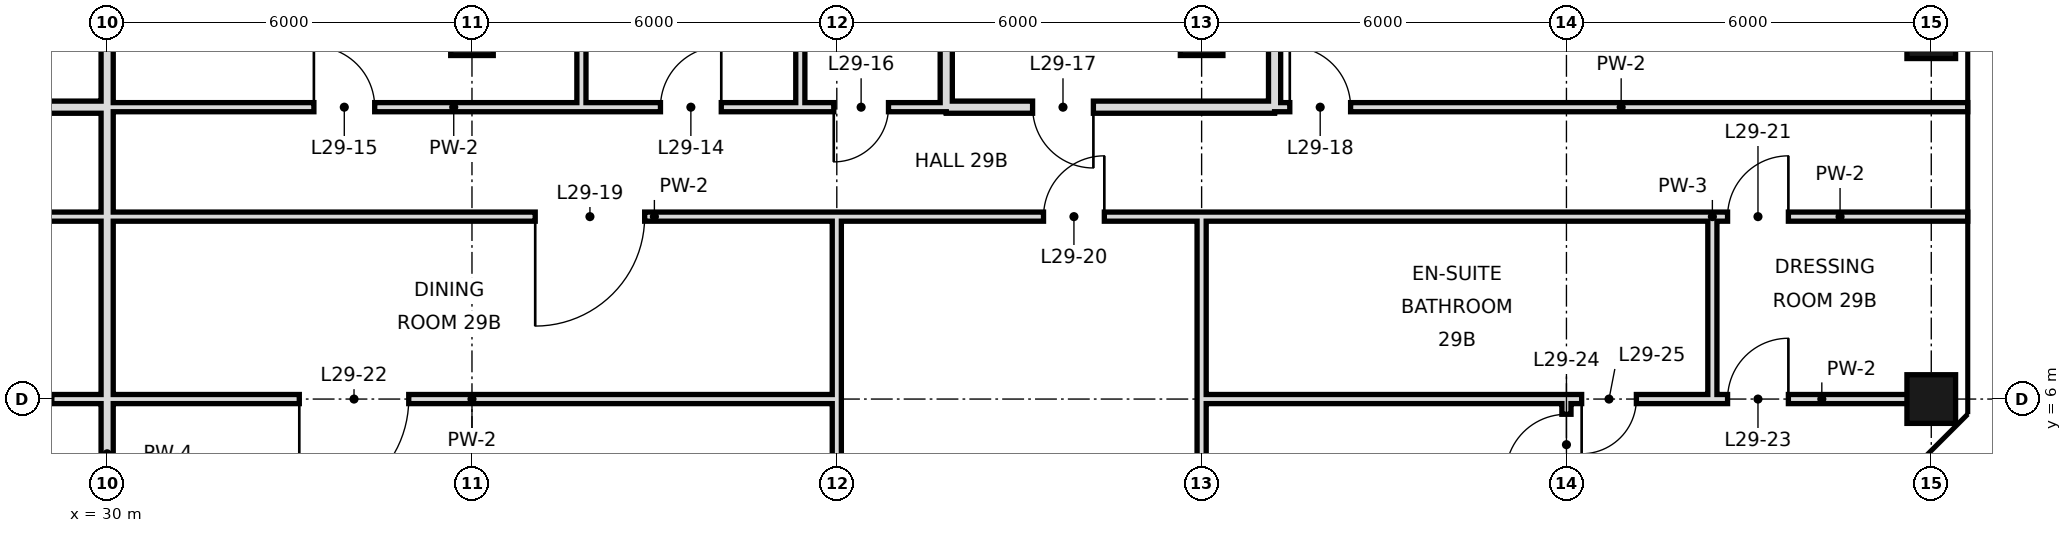
"""IFC4 building model, lengths in metres.
Left out: names, types, materials, properties, quantities, classifications, styles, units other than length and angle.
Written with IfcOpenShell. Run it as: python <this file> out.ifc"""

import sys

from ifc_helpers import new_model, si_unit, direction, frame, frame_2d, origin, origin_2d, place, context, subcontext, project, spatial, rectangle, hollow_rectangle, extrude, element, fill, save


model = new_model("IFC4")
c1 = context("Model", 3, precision=1e-05, world=origin(), true_north=direction((0.0, 1.0)))
c2 = subcontext(c1, "Body", "Model", "MODEL_VIEW")
j1 = project(units=[si_unit("LENGTHUNIT", "METRE"), si_unit("PLANEANGLEUNIT", "RADIAN")], contexts=[c1])
p1 = place(None, origin())
s1 = spatial("IfcSite", under=j1, at=p1, CompositionType="ELEMENT")
p2 = place(p1, origin())
s2 = spatial("IfcBuilding", under=s1, at=p2, CompositionType="ELEMENT")
p3 = place(p2, frame((0.0, 0.0, 130.4)))
s3 = spatial("IfcBuildingStorey", under=s2, at=p3, CompositionType="ELEMENT", Elevation=130.4)
for number, where, z_axis, x_axis in (
    (1, (36.0, 12.0, 0.0), (0.0, 0.0, 1.0), (1.0, 0.0, 0.0)),
    (2, (48.0, 12.0, 0.0), (0.0, 0.0, 1.0), (1.0, 0.0, 0.0)),
):
    element("IfcColumn", number, at=place(p3, frame(where, z_axis=z_axis, x_axis=x_axis)), inside=s3, PredefinedType="COLUMN", context=c2, shape_type="SweptSolid", body=[
        extrude(hollow_rectangle(XDim=0.7, YDim=0.7, WallThickness=0.036, at=origin_2d()), origin(), (0.0, 0.0, 1.0), 3.6),
    ])
for number, where, z_axis, x_axis in (
    (3, (60.0, 6.0, 0.0), (0.0, 0.0, 1.0), (1.0, 0.0, 0.0)),
    (4, (60.0, 12.0, 0.0), (0.0, 0.0, 1.0), (1.0, 0.0, 0.0)),
):
    element("IfcColumn", number, at=place(p3, frame(where, z_axis=z_axis, x_axis=x_axis)), inside=s3, PredefinedType="COLUMN", context=c2, shape_type="SweptSolid", body=[
        extrude(hollow_rectangle(XDim=0.8, YDim=0.8, WallThickness=0.04, at=origin_2d()), origin(), (0.0, 0.0, 1.0), 3.6),
    ])
p4 = place(p3, frame((30.0, 10.8, 0.0), z_axis=(0.0, 0.0, 1.0), x_axis=(0.0, 1.0, 0.0)))
e5 = element("IfcWall", 5, at=p4, inside=s3, PredefinedType="SOLIDWALL", context=c2, shape_type="SweptSolid", body=[
    extrude(rectangle(XDim=7.9, YDim=0.2, at=frame_2d((3.95, 0.0))), origin(), (0.0, 0.0, 1.0), 2.72),
])
p5 = place(p3, frame((30.0, -0.6, 0.0), z_axis=(0.0, 0.0, 1.0), x_axis=(0.0, 1.0, 0.0)))
e6 = element("IfcWall", 6, at=p5, inside=s3, PredefinedType="SOLIDWALL", context=c2, shape_type="SweptSolid", body=[
    extrude(rectangle(XDim=11.4, YDim=0.2, at=frame_2d((5.7, 0.0))), origin(), (0.0, 0.0, 1.0), 2.72),
])
for number, where, z_axis, x_axis in (
    (7, (37.8, 10.8, 0.0), (0.0, 0.0, 1.0), (0.0, 1.0, 0.0)),
    (8, (41.4, 10.8, 0.0), (0.0, 0.0, 1.0), (0.0, 1.0, 0.0)),
):
    element("IfcWall", number, at=place(p3, frame(where, z_axis=z_axis, x_axis=x_axis)), inside=s3, PredefinedType="PARTITIONING", context=c2, shape_type="SweptSolid", body=[
        extrude(rectangle(XDim=7.9, YDim=0.15, at=frame_2d((3.95, 0.0))), origin(), (0.0, 0.0, 1.0), 3.42),
    ])
p6 = place(p3, frame((42.0, -0.6, 0.0), z_axis=(0.0, 0.0, 1.0), x_axis=(0.0, 1.0, 0.0)))
e9 = element("IfcWall", 9, at=p6, inside=s3, PredefinedType="PARTITIONING", context=c2, shape_type="SweptSolid", body=[
    extrude(rectangle(XDim=9.6, YDim=0.15, at=frame_2d((4.8, 0.0))), origin(), (0.0, 0.0, 1.0), 3.42),
])
p7 = place(p3, frame((43.8, 10.8, 0.0), z_axis=(0.0, 0.0, 1.0), x_axis=(0.0, 1.0, 0.0)))
e10 = element("IfcWall", 10, at=p7, inside=s3, PredefinedType="SOLIDWALL", context=c2, shape_type="SweptSolid", body=[
    extrude(rectangle(XDim=7.9, YDim=0.2, at=frame_2d((3.95, 0.0))), origin(), (0.0, 0.0, 1.0), 2.72),
])
p8 = place(p3, frame((48.0, 0.0, 0.0), z_axis=(0.0, 0.0, 1.0), x_axis=(0.0, 1.0, 0.0)))
e11 = element("IfcWall", 11, at=p8, inside=s3, PredefinedType="PARTITIONING", context=c2, shape_type="SweptSolid", body=[
    extrude(rectangle(XDim=6.0, YDim=0.15, at=frame_2d((3.0, 0.0))), origin(), (0.0, 0.0, 1.0), 2.72),
])
p9 = place(p3, frame((48.0, 6.0, 0.0), z_axis=(0.0, 0.0, 1.0), x_axis=(0.0, 1.0, 0.0)))
e12 = element("IfcWall", 12, at=p9, inside=s3, PredefinedType="PARTITIONING", context=c2, shape_type="SweptSolid", body=[
    extrude(rectangle(XDim=3.0, YDim=0.15, at=frame_2d((1.5, 0.0))), origin(), (0.0, 0.0, 1.0), 2.72),
])
p10 = place(p3, frame((49.2, 10.8, 0.0), z_axis=(0.0, 0.0, 1.0), x_axis=(0.0, 1.0, 0.0)))
e13 = element("IfcWall", 13, at=p10, inside=s3, PredefinedType="SOLIDWALL", context=c2, shape_type="SweptSolid", body=[
    extrude(rectangle(XDim=7.2, YDim=0.2, at=frame_2d((3.6, 0.0))), origin(), (0.0, 0.0, 1.0), 2.72),
])
p11 = place(p3, frame((54.0, 0.0, 0.0), z_axis=(0.0, 0.0, 1.0), x_axis=(0.0, 1.0, 0.0)))
e14 = element("IfcWall", 14, at=p11, inside=s3, PredefinedType="PARTITIONING", context=c2, shape_type="SweptSolid", body=[
    extrude(rectangle(XDim=6.0, YDim=0.15, at=frame_2d((3.0, 0.0))), origin(), (0.0, 0.0, 1.0), 3.42),
])
p12 = place(p11, frame((4.75, 0.0, 0.0)))
e15 = element("IfcOpeningElement", 15, at=p12, cuts=e14, PredefinedType="OPENING", context=c2, shape_type="SweptSolid", body=[
    extrude(rectangle(XDim=1.0, YDim=2.4, at=frame_2d((0.5, 1.2))), frame((0.0, 0.085, 0.0), z_axis=(0.0, -1.0, 0.0), x_axis=(1.0, 0.0, 0.0)), (0.0, 0.0, 1.0), 0.17),
])
p13 = place(p3, frame((56.4, 6.0, 0.0), z_axis=(0.0, 0.0, 1.0), x_axis=(0.0, 1.0, 0.0)))
e16 = element("IfcWall", 16, at=p13, inside=s3, PredefinedType="PARTITIONING", context=c2, shape_type="SweptSolid", body=[
    extrude(rectangle(XDim=3.0, YDim=0.15, at=frame_2d((1.5, 0.0))), origin(), (0.0, 0.0, 1.0), 3.42),
])
p14 = place(p3, frame((25.2, 10.8, 0.0), z_axis=(0.0, 0.0, 1.0), x_axis=(1.0, 0.0, 0.0)))
e17 = element("IfcWall", 17, at=p14, inside=s3, PredefinedType="SOLIDWALL", context=c2, shape_type="SweptSolid", body=[
    extrude(rectangle(XDim=4.8, YDim=0.2, at=frame_2d((2.4, 0.0))), origin(), (0.0, 0.0, 1.0), 2.72),
])
p15 = place(p14, frame((1.9, 0.0, 0.0)))
e18 = element("IfcOpeningElement", 18, at=p15, cuts=e17, PredefinedType="OPENING", context=c2, shape_type="SweptSolid", body=[
    extrude(rectangle(XDim=1.0, YDim=2.4, at=frame_2d((0.5, 1.2))), frame((0.0, 0.11, 0.0), z_axis=(0.0, -1.0, 0.0), x_axis=(1.0, 0.0, 0.0)), (0.0, 0.0, 1.0), 0.22),
])
p16 = place(p3, frame((43.8, 10.8, 0.0), z_axis=(0.0, 0.0, 1.0), x_axis=(1.0, 0.0, 0.0)))
e19 = element("IfcWall", 19, at=p16, inside=s3, PredefinedType="SOLIDWALL", context=c2, shape_type="SweptSolid", body=[
    extrude(rectangle(XDim=5.4, YDim=0.2, at=frame_2d((2.7, 0.0))), origin(), (0.0, 0.0, 1.0), 2.72),
])
p17 = place(p16, frame((1.42, 0.0, 0.0)))
e20 = element("IfcOpeningElement", 20, at=p17, cuts=e19, PredefinedType="OPENING", context=c2, shape_type="SweptSolid", body=[
    extrude(rectangle(XDim=1.0, YDim=2.4, at=frame_2d((0.5, 1.2))), frame((0.0, 0.11, 0.0), z_axis=(0.0, -1.0, 0.0), x_axis=(1.0, 0.0, 0.0)), (0.0, 0.0, 1.0), 0.22),
])
p18 = place(p3, frame((30.0, 10.8, 0.0), z_axis=(0.0, 0.0, 1.0), x_axis=(1.0, 0.0, 0.0)))
e21 = element("IfcWall", 21, at=p18, inside=s3, PredefinedType="PARTITIONING", context=c2, shape_type="SweptSolid", body=[
    extrude(rectangle(XDim=11.4, YDim=0.15, at=frame_2d((5.7, 0.0))), origin(), (0.0, 0.0, 1.0), 3.42),
])
p19 = place(p18, frame((9.1, 0.0, 0.0)))
e22 = element("IfcOpeningElement", 22, at=p19, cuts=e21, PredefinedType="OPENING", context=c2, shape_type="SweptSolid", body=[
    extrude(rectangle(XDim=1.0, YDim=2.4, at=frame_2d((0.5, 1.2))), frame((0.0, 0.085, 0.0), z_axis=(0.0, -1.0, 0.0), x_axis=(1.0, 0.0, 0.0)), (0.0, 0.0, 1.0), 0.17),
])
p20 = place(p18, frame((3.4, 0.0, 0.0)))
e23 = element("IfcOpeningElement", 23, at=p20, cuts=e21, PredefinedType="OPENING", context=c2, shape_type="SweptSolid", body=[
    extrude(rectangle(XDim=1.0, YDim=2.4, at=frame_2d((0.5, 1.2))), frame((0.0, 0.085, 0.0), z_axis=(0.0, -1.0, 0.0), x_axis=(1.0, 0.0, 0.0)), (0.0, 0.0, 1.0), 0.17),
])
p21 = place(p3, frame((49.2, 10.8, 0.0), z_axis=(0.0, 0.0, 1.0), x_axis=(1.0, 0.0, 0.0)))
e24 = element("IfcWall", 24, at=p21, inside=s3, PredefinedType="PARTITIONING", context=c2, shape_type="SweptSolid", body=[
    extrude(rectangle(XDim=11.4, YDim=0.15, at=frame_2d((5.7, 0.0))), origin(), (0.0, 0.0, 1.0), 3.42),
])
p22 = place(p21, frame((0.25, 0.0, 0.0)))
e25 = element("IfcOpeningElement", 25, at=p22, cuts=e24, PredefinedType="OPENING", context=c2, shape_type="SweptSolid", body=[
    extrude(rectangle(XDim=1.0, YDim=2.4, at=frame_2d((0.5, 1.2))), frame((0.0, 0.085, 0.0), z_axis=(0.0, -1.0, 0.0), x_axis=(1.0, 0.0, 0.0)), (0.0, 0.0, 1.0), 0.17),
])
p23 = place(p3, frame((41.4, 10.8, 0.0), z_axis=(0.0, 0.0, 1.0), x_axis=(1.0, 0.0, 0.0)))
e26 = element("IfcWall", 26, at=p23, inside=s3, PredefinedType="PARTITIONING", context=c2, shape_type="SweptSolid", body=[
    extrude(rectangle(XDim=2.4, YDim=0.15, at=frame_2d((1.2, 0.0))), origin(), (0.0, 0.0, 1.0), 3.42),
])
p24 = place(p23, frame((0.55, 0.0, 0.0)))
e27 = element("IfcOpeningElement", 27, at=p24, cuts=e26, PredefinedType="OPENING", context=c2, shape_type="SweptSolid", body=[
    extrude(rectangle(XDim=0.9, YDim=2.4, at=frame_2d((0.45, 1.2))), frame((0.0, 0.085, 0.0), z_axis=(0.0, -1.0, 0.0), x_axis=(1.0, 0.0, 0.0)), (0.0, 0.0, 1.0), 0.17),
])
p25 = place(p3, frame((30.0, 6.0, 0.0), z_axis=(0.0, 0.0, 1.0), x_axis=(1.0, 0.0, 0.0)))
e28 = element("IfcWall", 28, at=p25, inside=s3, PredefinedType="PARTITIONING", context=c2, shape_type="SweptSolid", body=[
    extrude(rectangle(XDim=12.0, YDim=0.15, at=frame_2d((6.0, 0.0))), origin(), (0.0, 0.0, 1.0), 2.72),
])
p26 = place(p25, frame((3.16, 0.0, 0.0)))
e29 = element("IfcOpeningElement", 29, at=p26, cuts=e28, PredefinedType="OPENING", context=c2, shape_type="SweptSolid", body=[
    extrude(rectangle(XDim=1.8, YDim=2.4, at=frame_2d((0.9, 1.2))), frame((0.0, 0.085, 0.0), z_axis=(0.0, -1.0, 0.0), x_axis=(1.0, 0.0, 0.0)), (0.0, 0.0, 1.0), 0.17),
])
p27 = place(p3, frame((56.4, 6.0, 0.0), z_axis=(0.0, 0.0, 1.0), x_axis=(1.0, 0.0, 0.0)))
e30 = element("IfcWall", 30, at=p27, inside=s3, PredefinedType="PARTITIONING", context=c2, shape_type="SweptSolid", body=[
    extrude(rectangle(XDim=3.6, YDim=0.15, at=frame_2d((1.8, 0.0))), origin(), (0.0, 0.0, 1.0), 2.72),
])
p28 = place(p27, frame((0.25, 0.0, 0.0)))
e31 = element("IfcOpeningElement", 31, at=p28, cuts=e30, PredefinedType="OPENING", context=c2, shape_type="SweptSolid", body=[
    extrude(rectangle(XDim=1.0, YDim=2.4, at=frame_2d((0.5, 1.2))), frame((0.0, 0.085, 0.0), z_axis=(0.0, -1.0, 0.0), x_axis=(1.0, 0.0, 0.0)), (0.0, 0.0, 1.0), 0.17),
])
p29 = place(p3, frame((26.4, 6.0, 0.0), z_axis=(0.0, 0.0, 1.0), x_axis=(1.0, 0.0, 0.0)))
e32 = element("IfcWall", 32, at=p29, inside=s3, PredefinedType="PARTITIONING", context=c2, shape_type="SweptSolid", body=[
    extrude(rectangle(XDim=3.6, YDim=0.15, at=frame_2d((1.8, 0.0))), origin(), (0.0, 0.0, 1.0), 2.97),
])
p30 = place(p29, frame((1.79, 0.0, 0.0)))
e33 = element("IfcOpeningElement", 33, at=p30, cuts=e32, PredefinedType="OPENING", context=c2, shape_type="SweptSolid", body=[
    extrude(rectangle(XDim=0.9, YDim=2.4, at=frame_2d((0.45, 1.2))), frame((0.0, 0.085, 0.0), z_axis=(0.0, -1.0, 0.0), x_axis=(1.0, 0.0, 0.0)), (0.0, 0.0, 1.0), 0.17),
])
p31 = place(p3, frame((48.0, 6.0, 0.0), z_axis=(0.0, 0.0, 1.0), x_axis=(1.0, 0.0, 0.0)))
e34 = element("IfcWall", 34, at=p31, inside=s3, PredefinedType="PARTITIONING", context=c2, shape_type="SweptSolid", body=[
    extrude(rectangle(XDim=8.4, YDim=0.15, at=frame_2d((4.2, 0.0))), origin(), (0.0, 0.0, 1.0), 2.72),
])
p32 = place(p31, frame((6.25, 0.0, 0.0)))
e35 = element("IfcOpeningElement", 35, at=p32, cuts=e34, PredefinedType="OPENING", context=c2, shape_type="SweptSolid", body=[
    extrude(rectangle(XDim=0.9, YDim=2.4, at=frame_2d((0.45, 1.2))), frame((0.0, 0.085, 0.0), z_axis=(0.0, -1.0, 0.0), x_axis=(1.0, 0.0, 0.0)), (0.0, 0.0, 1.0), 0.17),
])
p33 = place(p3, frame((30.0, 9.0, 0.0), z_axis=(0.0, 0.0, 1.0), x_axis=(1.0, 0.0, 0.0)))
e36 = element("IfcWall", 36, at=p33, inside=s3, PredefinedType="PARTITIONING", context=c2, shape_type="SweptSolid", body=[
    extrude(rectangle(XDim=18.0, YDim=0.15, at=frame_2d((9.0, 0.0))), origin(), (0.0, 0.0, 1.0), 3.42),
])
p34 = place(p33, frame((7.04, 0.0, 0.0)))
e37 = element("IfcOpeningElement", 37, at=p34, cuts=e36, PredefinedType="OPENING", context=c2, shape_type="SweptSolid", body=[
    extrude(rectangle(XDim=1.8, YDim=2.4, at=frame_2d((0.9, 1.2))), frame((0.0, 0.085, 0.0), z_axis=(0.0, -1.0, 0.0), x_axis=(1.0, 0.0, 0.0)), (0.0, 0.0, 1.0), 0.17),
])
p35 = place(p33, frame((15.4, 0.0, 0.0)))
e38 = element("IfcOpeningElement", 38, at=p35, cuts=e36, PredefinedType="OPENING", context=c2, shape_type="SweptSolid", body=[
    extrude(rectangle(XDim=1.0, YDim=2.4, at=frame_2d((0.5, 1.2))), frame((0.0, 0.085, 0.0), z_axis=(0.0, -1.0, 0.0), x_axis=(1.0, 0.0, 0.0)), (0.0, 0.0, 1.0), 0.17),
])
p36 = place(p3, frame((56.4, 9.0, 0.0), z_axis=(0.0, 0.0, 1.0), x_axis=(1.0, 0.0, 0.0)))
e39 = element("IfcWall", 39, at=p36, inside=s3, PredefinedType="PARTITIONING", context=c2, shape_type="SweptSolid", body=[
    extrude(rectangle(XDim=4.2, YDim=0.15, at=frame_2d((2.1, 0.0))), origin(), (0.0, 0.0, 1.0), 3.42),
])
p37 = place(p36, frame((0.25, 0.0, 0.0)))
e40 = element("IfcOpeningElement", 40, at=p37, cuts=e39, PredefinedType="OPENING", context=c2, shape_type="SweptSolid", body=[
    extrude(rectangle(XDim=1.0, YDim=2.4, at=frame_2d((0.5, 1.2))), frame((0.0, 0.085, 0.0), z_axis=(0.0, -1.0, 0.0), x_axis=(1.0, 0.0, 0.0)), (0.0, 0.0, 1.0), 0.17),
])
p38 = place(p3, frame((26.4, 9.0, 0.0), z_axis=(0.0, 0.0, 1.0), x_axis=(1.0, 0.0, 0.0)))
e41 = element("IfcWall", 41, at=p38, inside=s3, PredefinedType="PARTITIONING", context=c2, shape_type="SweptSolid", body=[
    extrude(rectangle(XDim=3.6, YDim=0.15, at=frame_2d((1.8, 0.0))), origin(), (0.0, 0.0, 1.0), 3.42),
])
p39 = place(p3, frame((48.0, 9.0, 0.0), z_axis=(0.0, 0.0, 1.0), x_axis=(1.0, 0.0, 0.0)))
e42 = element("IfcWall", 42, at=p39, inside=s3, PredefinedType="PARTITIONING", context=c2, shape_type="SweptSolid", body=[
    extrude(rectangle(XDim=8.4, YDim=0.15, at=frame_2d((4.2, 0.0))), origin(), (0.0, 0.0, 1.0), 3.42),
])
p40 = place(p19, frame((1.0, 0.0, 0.0), z_axis=(0.0, 0.0, 1.0), x_axis=(-1.0, 0.0, 0.0)))
e43 = element("IfcDoor", 43, at=p40, inside=s3, OperationType="SINGLE_SWING_LEFT", PredefinedType="DOOR", context=c2, shape_type="SweptSolid", body=[
    extrude(rectangle(XDim=1.0, YDim=2.4, at=frame_2d((0.5, 1.2))), frame((0.0, 0.025, 0.0), z_axis=(0.0, -1.0, 0.0), x_axis=(1.0, 0.0, 0.0)), (0.0, 0.0, 1.0), 0.05),
])
fill(e22, e43)
p41 = place(p20, origin())
e44 = element("IfcDoor", 44, at=p41, inside=s3, OperationType="SINGLE_SWING_LEFT", PredefinedType="DOOR", context=c2, shape_type="SweptSolid", body=[
    extrude(rectangle(XDim=1.0, YDim=2.4, at=frame_2d((0.5, 1.2))), frame((0.0, 0.025, 0.0), z_axis=(0.0, -1.0, 0.0), x_axis=(1.0, 0.0, 0.0)), (0.0, 0.0, 1.0), 0.05),
])
fill(e23, e44)
p42 = place(p24, frame((0.9, 0.0, 0.0), z_axis=(0.0, 0.0, 1.0), x_axis=(-1.0, 0.0, 0.0)))
e45 = element("IfcDoor", 45, at=p42, inside=s3, OperationType="SINGLE_SWING_RIGHT", PredefinedType="DOOR", context=c2, shape_type="SweptSolid", body=[
    extrude(rectangle(XDim=0.9, YDim=2.4, at=frame_2d((0.45, 1.2))), frame((0.0, 0.025, 0.0), z_axis=(0.0, -1.0, 0.0), x_axis=(1.0, 0.0, 0.0)), (0.0, 0.0, 1.0), 0.05),
])
fill(e27, e45)
p43 = place(p17, origin())
e46 = element("IfcDoor", 46, at=p43, inside=s3, OperationType="SINGLE_SWING_RIGHT", PredefinedType="DOOR", context=c2, shape_type="SweptSolid", body=[
    extrude(rectangle(XDim=1.0, YDim=2.4, at=frame_2d((0.5, 1.2))), frame((0.0, 0.025, 0.0), z_axis=(0.0, -1.0, 0.0), x_axis=(1.0, 0.0, 0.0)), (0.0, 0.0, 1.0), 0.05),
])
fill(e20, e46)
p44 = place(p22, origin())
e47 = element("IfcDoor", 47, at=p44, inside=s3, OperationType="SINGLE_SWING_LEFT", PredefinedType="DOOR", context=c2, shape_type="SweptSolid", body=[
    extrude(rectangle(XDim=1.0, YDim=2.4, at=frame_2d((0.5, 1.2))), frame((0.0, 0.025, 0.0), z_axis=(0.0, -1.0, 0.0), x_axis=(1.0, 0.0, 0.0)), (0.0, 0.0, 1.0), 0.05),
])
fill(e25, e47)
p45 = place(p34, frame((1.8, 0.0, 0.0), z_axis=(0.0, 0.0, 1.0), x_axis=(-1.0, 0.0, 0.0)))
e48 = element("IfcDoor", 48, at=p45, inside=s3, OperationType="SINGLE_SWING_RIGHT", PredefinedType="DOOR", context=c2, shape_type="SweptSolid", body=[
    extrude(rectangle(XDim=1.8, YDim=2.4, at=frame_2d((0.9, 1.2))), frame((0.0, 0.025, 0.0), z_axis=(0.0, -1.0, 0.0), x_axis=(1.0, 0.0, 0.0)), (0.0, 0.0, 1.0), 0.05),
])
fill(e37, e48)
p46 = place(p35, frame((1.0, 0.0, 0.0), z_axis=(0.0, 0.0, 1.0), x_axis=(-1.0, 0.0, 0.0)))
e49 = element("IfcDoor", 49, at=p46, inside=s3, OperationType="SINGLE_SWING_LEFT", PredefinedType="DOOR", context=c2, shape_type="SweptSolid", body=[
    extrude(rectangle(XDim=1.0, YDim=2.4, at=frame_2d((0.5, 1.2))), frame((0.0, 0.025, 0.0), z_axis=(0.0, -1.0, 0.0), x_axis=(1.0, 0.0, 0.0)), (0.0, 0.0, 1.0), 0.05),
])
fill(e38, e49)
p47 = place(p37, frame((1.0, 0.0, 0.0), z_axis=(0.0, 0.0, 1.0), x_axis=(-1.0, 0.0, 0.0)))
e50 = element("IfcDoor", 50, at=p47, inside=s3, OperationType="SINGLE_SWING_LEFT", PredefinedType="DOOR", context=c2, shape_type="SweptSolid", body=[
    extrude(rectangle(XDim=1.0, YDim=2.4, at=frame_2d((0.5, 1.2))), frame((0.0, 0.025, 0.0), z_axis=(0.0, -1.0, 0.0), x_axis=(1.0, 0.0, 0.0)), (0.0, 0.0, 1.0), 0.05),
])
fill(e40, e50)
p48 = place(p26, frame((1.8, 0.0, 0.0), z_axis=(0.0, 0.0, 1.0), x_axis=(-1.0, 0.0, 0.0)))
e51 = element("IfcDoor", 51, at=p48, inside=s3, OperationType="SINGLE_SWING_RIGHT", PredefinedType="DOOR", context=c2, shape_type="SweptSolid", body=[
    extrude(rectangle(XDim=1.8, YDim=2.4, at=frame_2d((0.9, 1.2))), frame((0.0, 0.025, 0.0), z_axis=(0.0, -1.0, 0.0), x_axis=(1.0, 0.0, 0.0)), (0.0, 0.0, 1.0), 0.05),
])
fill(e29, e51)
p49 = place(p28, frame((1.0, 0.0, 0.0), z_axis=(0.0, 0.0, 1.0), x_axis=(-1.0, 0.0, 0.0)))
e52 = element("IfcDoor", 52, at=p49, inside=s3, OperationType="SINGLE_SWING_LEFT", PredefinedType="DOOR", context=c2, shape_type="SweptSolid", body=[
    extrude(rectangle(XDim=1.0, YDim=2.4, at=frame_2d((0.5, 1.2))), frame((0.0, 0.025, 0.0), z_axis=(0.0, -1.0, 0.0), x_axis=(1.0, 0.0, 0.0)), (0.0, 0.0, 1.0), 0.05),
])
fill(e31, e52)
p50 = place(p12, origin())
e53 = element("IfcDoor", 53, at=p50, inside=s3, OperationType="SINGLE_SWING_LEFT", PredefinedType="DOOR", context=c2, shape_type="SweptSolid", body=[
    extrude(rectangle(XDim=1.0, YDim=2.4, at=frame_2d((0.5, 1.2))), frame((0.0, 0.025, 0.0), z_axis=(0.0, -1.0, 0.0), x_axis=(1.0, 0.0, 0.0)), (0.0, 0.0, 1.0), 0.05),
])
fill(e15, e53)
p51 = place(p32, frame((0.9, 0.0, 0.0), z_axis=(0.0, 0.0, 1.0), x_axis=(-1.0, 0.0, 0.0)))
e54 = element("IfcDoor", 54, at=p51, inside=s3, OperationType="SINGLE_SWING_RIGHT", PredefinedType="DOOR", context=c2, shape_type="SweptSolid", body=[
    extrude(rectangle(XDim=0.9, YDim=2.4, at=frame_2d((0.45, 1.2))), frame((0.0, 0.025, 0.0), z_axis=(0.0, -1.0, 0.0), x_axis=(1.0, 0.0, 0.0)), (0.0, 0.0, 1.0), 0.05),
])
fill(e35, e54)
save(model, sys.argv[1])
